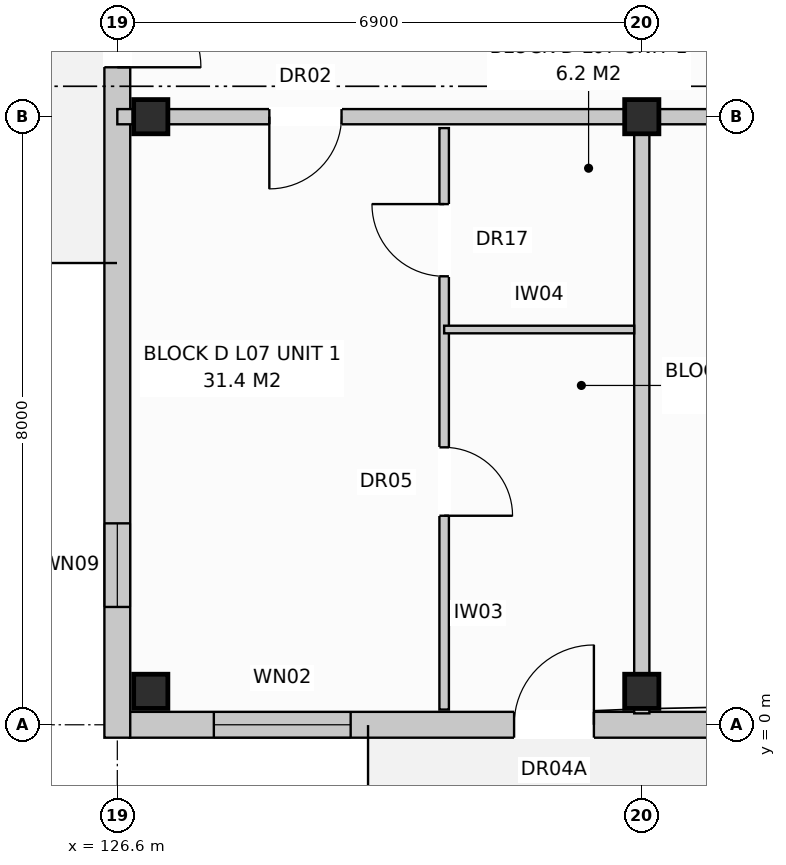
"""IFC4 building model, lengths in metres.
Left out: names, types, materials, properties, quantities, classifications, styles, units other than length and angle.
Written with IfcOpenShell. Run it as: python <this file> out.ifc"""

import sys

from ifc_helpers import new_model, si_unit, direction, frame, frame_2d, origin, origin_with_axes, origin_2d, place, context, subcontext, project, spatial, rectangle, extrude, element, fill, save


model = new_model("IFC4")
c1 = context("Model", 3, precision=1e-05, world=origin(), true_north=direction((0.0, 1.0)))
c2 = subcontext(c1, "Body", "Model", "MODEL_VIEW")
j1 = project(units=[si_unit("LENGTHUNIT", "METRE"), si_unit("PLANEANGLEUNIT", "RADIAN")], contexts=[c1])
p1 = place(None, origin())
s1 = spatial("IfcSite", under=j1, at=p1, CompositionType="ELEMENT")
p2 = place(p1, origin())
s2 = spatial("IfcBuilding", under=s1, at=p2, CompositionType="ELEMENT")
p3 = place(p2, frame((0.0, 0.0, 24.0)))
s3 = spatial("IfcBuildingStorey", under=s2, at=p3, CompositionType="ELEMENT", Elevation=24.0)
for number, where, z_axis, x_axis in (
    (1, (127.04, 0.44, 0.0), (0.0, 0.0, 1.0), (1.0, 0.0, 0.0)),
    (2, (127.04, 8.0, 0.0), (0.0, 0.0, 1.0), (1.0, 0.0, 0.0)),
    (3, (133.5, 0.44, 0.0), (0.0, 0.0, 1.0), (1.0, 0.0, 0.0)),
    (4, (133.5, 8.0, 0.0), (0.0, 0.0, 1.0), (1.0, 0.0, 0.0)),
):
    element("IfcColumn", number, at=place(p3, frame(where, z_axis=z_axis, x_axis=x_axis)), inside=s3, PredefinedType="COLUMN", context=c2, shape_type="SweptSolid", body=[
        extrude(rectangle(XDim=0.45, YDim=0.45, at=origin_2d()), origin(), (0.0, 0.0, 1.0), 3.2),
    ])
p4 = place(p3, frame((126.76, 0.0, 0.0), z_axis=(0.0, 0.0, 1.0), x_axis=(1.0, 0.0, 0.0)))
e5 = element("IfcWall", 5, at=p4, inside=s3, PredefinedType="STANDARD", context=c2, shape_type="SweptSolid", body=[
    extrude(rectangle(XDim=41.08, YDim=0.34, at=frame_2d((20.54, 0.0))), origin(), (0.0, 0.0, 1.0), 2.95),
])
p5 = place(p4, frame((5.06, 0.0, 0.0)))
e6 = element("IfcOpeningElement", 6, at=p5, cuts=e5, PredefinedType="OPENING", context=c2, shape_type="SweptSolid", body=[
    extrude(rectangle(XDim=1.05, YDim=2.12, at=frame_2d((0.525, 1.06))), frame((0.0, 0.182, 0.0), z_axis=(0.0, -1.0, 0.0), x_axis=(1.0, 0.0, 0.0)), (0.0, 0.0, 1.0), 0.364),
])
p6 = place(p4, frame((18.86, 0.0, 0.0)))
e7 = element("IfcOpeningElement", 7, at=p6, cuts=e5, PredefinedType="OPENING", context=c2, shape_type="SweptSolid", body=[
    extrude(rectangle(XDim=1.05, YDim=2.12, at=frame_2d((0.525, 1.06))), frame((0.0, 0.182, 0.0), z_axis=(0.0, -1.0, 0.0), x_axis=(1.0, 0.0, 0.0)), (0.0, 0.0, 1.0), 0.364),
])
p7 = place(p4, frame((31.359, 0.0, 0.0)))
e8 = element("IfcOpeningElement", 8, at=p7, cuts=e5, PredefinedType="OPENING", context=c2, shape_type="SweptSolid", body=[
    extrude(rectangle(XDim=1.05, YDim=2.12, at=frame_2d((0.525, 1.06))), frame((0.0, 0.182, 0.0), z_axis=(0.0, -1.0, 0.0), x_axis=(1.0, 0.0, 0.0)), (0.0, 0.0, 1.0), 0.364),
])
p8 = place(p4, frame((1.11, 0.0, 0.8)))
e9 = element("IfcOpeningElement", 9, at=p8, cuts=e5, PredefinedType="OPENING", context=c2, shape_type="SweptSolid", body=[
    extrude(rectangle(XDim=1.8, YDim=1.7, at=frame_2d((0.9, 0.85))), frame((0.0, 0.182, 0.0), z_axis=(0.0, -1.0, 0.0), x_axis=(1.0, 0.0, 0.0)), (0.0, 0.0, 1.0), 0.364),
])
p9 = place(p4, frame((9.36, 0.0, 0.72)))
e10 = element("IfcOpeningElement", 10, at=p9, cuts=e5, PredefinedType="OPENING", context=c2, shape_type="SweptSolid", body=[
    extrude(rectangle(XDim=1.1, YDim=1.5, at=frame_2d((0.55, 0.75))), frame((0.0, 0.182, 0.0), z_axis=(0.0, -1.0, 0.0), x_axis=(1.0, 0.0, 0.0)), (0.0, 0.0, 1.0), 0.364),
])
p10 = place(p4, frame((14.635, 0.0, 0.8)))
e11 = element("IfcOpeningElement", 11, at=p10, cuts=e5, PredefinedType="OPENING", context=c2, shape_type="SweptSolid", body=[
    extrude(rectangle(XDim=1.95, YDim=1.65, at=frame_2d((0.975, 0.825))), frame((0.0, 0.182, 0.0), z_axis=(0.0, -1.0, 0.0), x_axis=(1.0, 0.0, 0.0)), (0.0, 0.0, 1.0), 0.364),
])
p11 = place(p4, frame((21.46, 0.0, 0.72)))
e12 = element("IfcOpeningElement", 12, at=p11, cuts=e5, PredefinedType="OPENING", context=c2, shape_type="SweptSolid", body=[
    extrude(rectangle(XDim=1.1, YDim=1.5, at=frame_2d((0.55, 0.75))), frame((0.0, 0.182, 0.0), z_axis=(0.0, -1.0, 0.0), x_axis=(1.0, 0.0, 0.0)), (0.0, 0.0, 1.0), 0.364),
])
p12 = place(p4, frame((24.46, 0.0, 0.8)))
e13 = element("IfcOpeningElement", 13, at=p12, cuts=e5, PredefinedType="OPENING", context=c2, shape_type="SweptSolid", body=[
    extrude(rectangle(XDim=1.9, YDim=1.85, at=frame_2d((0.95, 0.925))), frame((0.0, 0.182, 0.0), z_axis=(0.0, -1.0, 0.0), x_axis=(1.0, 0.0, 0.0)), (0.0, 0.0, 1.0), 0.364),
])
p13 = place(p4, frame((29.135, 0.0, 0.8)))
e14 = element("IfcOpeningElement", 14, at=p13, cuts=e5, PredefinedType="OPENING", context=c2, shape_type="SweptSolid", body=[
    extrude(rectangle(XDim=1.95, YDim=1.65, at=frame_2d((0.975, 0.825))), frame((0.0, 0.182, 0.0), z_axis=(0.0, -1.0, 0.0), x_axis=(1.0, 0.0, 0.0)), (0.0, 0.0, 1.0), 0.364),
])
p14 = place(p4, frame((35.26, 0.0, 0.72)))
e15 = element("IfcOpeningElement", 15, at=p14, cuts=e5, PredefinedType="OPENING", context=c2, shape_type="SweptSolid", body=[
    extrude(rectangle(XDim=1.1, YDim=1.5, at=frame_2d((0.55, 0.75))), frame((0.0, 0.182, 0.0), z_axis=(0.0, -1.0, 0.0), x_axis=(1.0, 0.0, 0.0)), (0.0, 0.0, 1.0), 0.364),
])
p15 = place(p4, frame((38.06, 0.0, 0.8)))
e16 = element("IfcOpeningElement", 16, at=p15, cuts=e5, PredefinedType="OPENING", context=c2, shape_type="SweptSolid", body=[
    extrude(rectangle(XDim=1.9, YDim=1.85, at=frame_2d((0.95, 0.925))), frame((0.0, 0.182, 0.0), z_axis=(0.0, -1.0, 0.0), x_axis=(1.0, 0.0, 0.0)), (0.0, 0.0, 1.0), 0.364),
])
p16 = place(p3, frame((126.6, -0.17, 0.0), z_axis=(0.0, 0.0, 1.0), x_axis=(0.0, 1.0, 0.0)))
e17 = element("IfcWall", 17, at=p16, inside=s3, PredefinedType="STANDARD", context=c2, shape_type="SweptSolid", body=[
    extrude(rectangle(XDim=18.74, YDim=0.34, at=frame_2d((9.37, 0.0))), origin(), (0.0, 0.0, 1.0), 2.95),
])
p17 = place(p16, frame((8.82, 0.0, 0.0)))
e18 = element("IfcOpeningElement", 18, at=p17, cuts=e17, PredefinedType="OPENING", context=c2, shape_type="SweptSolid", body=[
    extrude(rectangle(XDim=1.1, YDim=2.1, at=frame_2d((0.55, 1.05))), frame((0.0, 0.182, 0.0), z_axis=(0.0, -1.0, 0.0), x_axis=(1.0, 0.0, 0.0)), (0.0, 0.0, 1.0), 0.364),
])
p18 = place(p16, frame((1.72, 0.0, 0.72)))
e19 = element("IfcOpeningElement", 19, at=p18, cuts=e17, PredefinedType="OPENING", context=c2, shape_type="SweptSolid", body=[
    extrude(rectangle(XDim=1.1, YDim=1.5, at=frame_2d((0.55, 0.75))), frame((0.0, 0.182, 0.0), z_axis=(0.0, -1.0, 0.0), x_axis=(1.0, 0.0, 0.0)), (0.0, 0.0, 1.0), 0.364),
])
p19 = place(p3, frame((133.5, 7.85, 0.0), z_axis=(0.0, 0.0, 1.0), x_axis=(0.0, -1.0, 0.0)))
e20 = element("IfcWall", 20, at=p19, inside=s3, PredefinedType="PARTITIONING", context=c2, shape_type="SweptSolid", body=[
    extrude(rectangle(XDim=7.7, YDim=0.2, at=frame_2d((3.85, 0.0))), origin(), (0.0, 0.0, 1.0), 2.39),
])
p20 = place(p3, frame((126.6, 8.0, 0.0), z_axis=(0.0, 0.0, 1.0), x_axis=(1.0, 0.0, 0.0)))
e21 = element("IfcWall", 21, at=p20, inside=s3, PredefinedType="PARTITIONING", context=c2, shape_type="SweptSolid", body=[
    extrude(rectangle(XDim=6.9, YDim=0.2, at=frame_2d((3.45, 0.0))), origin(), (0.0, 0.0, 1.0), 2.39),
])
p21 = place(p20, frame((2.0, 0.0, 0.0)))
e22 = element("IfcOpeningElement", 22, at=p21, cuts=e21, PredefinedType="OPENING", context=c2, shape_type="SweptSolid", body=[
    extrude(rectangle(XDim=0.95, YDim=2.15, at=frame_2d((0.475, 1.075))), frame((0.0, 0.112, 0.0), z_axis=(0.0, -1.0, 0.0), x_axis=(1.0, 0.0, 0.0)), (0.0, 0.0, 1.0), 0.224),
])
p22 = place(p3, frame((130.9, 7.85, 0.0), z_axis=(0.0, 0.0, 1.0), x_axis=(0.0, -1.0, 0.0)))
e23 = element("IfcWall", 23, at=p22, inside=s3, PredefinedType="PARTITIONING", context=c2, shape_type="SweptSolid", body=[
    extrude(rectangle(XDim=7.65, YDim=0.125, at=frame_2d((3.825, 0.0))), origin(), (0.0, 0.0, 1.0), 2.59),
])
p23 = place(p22, frame((1.0, 0.0, 0.0)))
e24 = element("IfcOpeningElement", 24, at=p23, cuts=e23, PredefinedType="OPENING", context=c2, shape_type="SweptSolid", body=[
    extrude(rectangle(XDim=0.95, YDim=2.1, at=frame_2d((0.475, 1.05))), frame((0.0, 0.074, 0.0), z_axis=(0.0, -1.0, 0.0), x_axis=(1.0, 0.0, 0.0)), (0.0, 0.0, 1.0), 0.149),
])
p24 = place(p22, frame((4.2, 0.0, 0.0)))
e25 = element("IfcOpeningElement", 25, at=p24, cuts=e23, PredefinedType="OPENING", context=c2, shape_type="SweptSolid", body=[
    extrude(rectangle(XDim=0.9, YDim=2.1, at=frame_2d((0.45, 1.05))), frame((0.0, 0.074, 0.0), z_axis=(0.0, -1.0, 0.0), x_axis=(1.0, 0.0, 0.0)), (0.0, 0.0, 1.0), 0.149),
])
p25 = place(p3, frame((130.9, 5.2, 0.0), z_axis=(0.0, 0.0, 1.0), x_axis=(1.0, 0.0, 0.0)))
e26 = element("IfcWall", 26, at=p25, inside=s3, PredefinedType="PARTITIONING", context=c2, shape_type="SweptSolid", body=[
    extrude(rectangle(XDim=2.5, YDim=0.1, at=frame_2d((1.25, 0.0))), origin(), (0.0, 0.0, 1.0), 2.95),
])
p26 = place(p3, frame((133.5, 8.0, 0.0), z_axis=(0.0, 0.0, 1.0), x_axis=(1.0, 0.0, 0.0)))
e27 = element("IfcWall", 27, at=p26, inside=s3, PredefinedType="PARTITIONING", context=c2, shape_type="SweptSolid", body=[
    extrude(rectangle(XDim=20.7, YDim=0.2, at=frame_2d((10.35, 0.0))), origin(), (0.0, 0.0, 1.0), 2.39),
])
p27 = place(p26, frame((2.4, 0.0, 0.0)))
e28 = element("IfcOpeningElement", 28, at=p27, cuts=e27, PredefinedType="OPENING", context=c2, shape_type="SweptSolid", body=[
    extrude(rectangle(XDim=0.95, YDim=2.15, at=frame_2d((0.475, 1.075))), frame((0.0, 0.112, 0.0), z_axis=(0.0, -1.0, 0.0), x_axis=(1.0, 0.0, 0.0)), (0.0, 0.0, 1.0), 0.224),
])
p28 = place(p5, origin_with_axes())
e29 = element("IfcDoor", 29, at=p28, inside=s3, OperationType="SINGLE_SWING_RIGHT", PredefinedType="DOOR", context=c2, shape_type="SweptSolid", body=[
    extrude(rectangle(XDim=1.05, YDim=2.12, at=frame_2d((0.525, 1.06))), frame((0.0, 0.025, 0.0), z_axis=(0.0, -1.0, 0.0), x_axis=(1.0, 0.0, 0.0)), (0.0, 0.0, 1.0), 0.05),
])
fill(e6, e29)
p29 = place(p8, origin_with_axes())
e30 = element("IfcWindow", 30, at=p29, inside=s3, PartitioningType="SINGLE_PANEL", PredefinedType="WINDOW", context=c2, shape_type="SweptSolid", body=[
    extrude(rectangle(XDim=1.8, YDim=1.7, at=frame_2d((0.9, 0.85))), frame((0.0, 0.03, 0.0), z_axis=(0.0, -1.0, 0.0), x_axis=(1.0, 0.0, 0.0)), (0.0, 0.0, 1.0), 0.06),
])
fill(e9, e30)
p30 = place(p17, frame((1.1, 0.0, 0.0), z_axis=(0.0, 0.0, 1.0), x_axis=(-1.0, 0.0, 0.0)))
e31 = element("IfcDoor", 31, at=p30, inside=s3, OperationType="SINGLE_SWING_LEFT", PredefinedType="DOOR", context=c2, shape_type="SweptSolid", body=[
    extrude(rectangle(XDim=1.1, YDim=2.1, at=frame_2d((0.55, 1.05))), frame((0.0, 0.025, 0.0), z_axis=(0.0, -1.0, 0.0), x_axis=(1.0, 0.0, 0.0)), (0.0, 0.0, 1.0), 0.05),
])
fill(e18, e31)
p31 = place(p18, origin_with_axes())
e32 = element("IfcWindow", 32, at=p31, inside=s3, PartitioningType="SINGLE_PANEL", PredefinedType="WINDOW", context=c2, shape_type="SweptSolid", body=[
    extrude(rectangle(XDim=1.1, YDim=1.5, at=frame_2d((0.55, 0.75))), frame((0.0, 0.03, 0.0), z_axis=(0.0, -1.0, 0.0), x_axis=(1.0, 0.0, 0.0)), (0.0, 0.0, 1.0), 0.06),
])
fill(e19, e32)
p32 = place(p21, frame((0.95, 0.0, 0.0), z_axis=(0.0, 0.0, 1.0), x_axis=(-1.0, 0.0, 0.0)))
e33 = element("IfcDoor", 33, at=p32, inside=s3, OperationType="SINGLE_SWING_LEFT", PredefinedType="DOOR", context=c2, shape_type="SweptSolid", body=[
    extrude(rectangle(XDim=0.95, YDim=2.15, at=frame_2d((0.475, 1.075))), frame((0.0, 0.025, 0.0), z_axis=(0.0, -1.0, 0.0), x_axis=(1.0, 0.0, 0.0)), (0.0, 0.0, 1.0), 0.05),
])
fill(e22, e33)
p33 = place(p23, frame((0.95, 0.0, 0.0), z_axis=(0.0, 0.0, 1.0), x_axis=(-1.0, 0.0, 0.0)))
e34 = element("IfcDoor", 34, at=p33, inside=s3, OperationType="SINGLE_SWING_LEFT", PredefinedType="DOOR", context=c2, shape_type="SweptSolid", body=[
    extrude(rectangle(XDim=0.95, YDim=2.1, at=frame_2d((0.475, 1.05))), frame((0.0, 0.025, 0.0), z_axis=(0.0, -1.0, 0.0), x_axis=(1.0, 0.0, 0.0)), (0.0, 0.0, 1.0), 0.05),
])
fill(e24, e34)
p34 = place(p24, origin_with_axes())
e35 = element("IfcDoor", 35, at=p34, inside=s3, OperationType="SINGLE_SWING_RIGHT", PredefinedType="DOOR", context=c2, shape_type="SweptSolid", body=[
    extrude(rectangle(XDim=0.9, YDim=2.1, at=frame_2d((0.45, 1.05))), frame((0.0, 0.025, 0.0), z_axis=(0.0, -1.0, 0.0), x_axis=(1.0, 0.0, 0.0)), (0.0, 0.0, 1.0), 0.05),
])
fill(e25, e35)
save(model, sys.argv[1])
